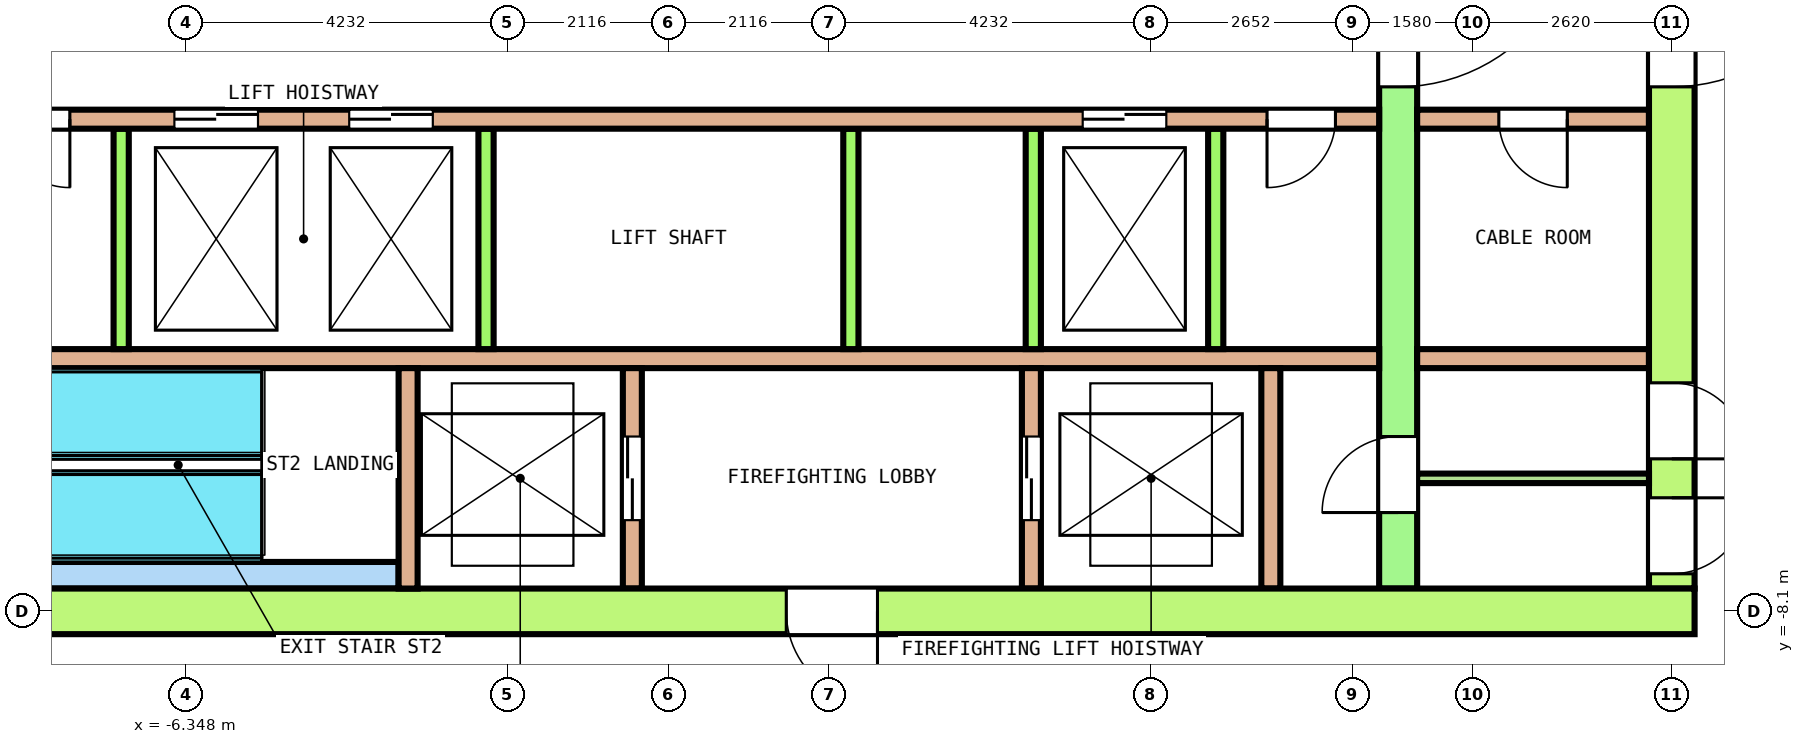
"""IFC4 building model, lengths in metres.
Left out: names, types, materials, properties, quantities, classifications, styles, units other than length and angle.
Written with IfcOpenShell. Run it as: python <this file> out.ifc"""

import sys

from ifc_helpers import new_model, si_unit, direction, frame, frame_2d, origin, place, context, subcontext, project, spatial, polyline, rectangle, outline, extrude, element, fill, save


model = new_model("IFC4")
c1 = context("Model", 3, precision=1e-05, world=origin(), true_north=direction((0.0, 1.0)))
c2 = subcontext(c1, "Body", "Model", "MODEL_VIEW")
j1 = project(units=[si_unit("LENGTHUNIT", "METRE"), si_unit("PLANEANGLEUNIT", "RADIAN")], contexts=[c1])
p1 = place(None, origin())
s1 = spatial("IfcSite", under=j1, at=p1, CompositionType="ELEMENT")
p2 = place(p1, origin())
s2 = spatial("IfcBuilding", under=s1, at=p2, CompositionType="ELEMENT")
p3 = place(p2, frame((0.0, 0.0, 223.4)))
s3 = spatial("IfcBuildingStorey", under=s2, at=p3, CompositionType="ELEMENT", Elevation=223.4)
p4 = place(p3, frame((13.914, -18.701, 0.0), z_axis=(0.0, 0.0, 1.0), x_axis=(0.499993148765, 0.866029359311, 0.0)))
e1 = element("IfcWall", 1, at=p4, inside=s3, PredefinedType="SOLIDWALL", context=c2, shape_type="SweptSolid", body=[
    extrude(outline(polyline([(-0.027, -0.1), (1.003, -0.1), (2.032, -0.1), (3.062, -0.1), (4.091, -0.1), (5.121, -0.1), (6.15, -0.1), (7.179, -0.1), (8.209, -0.1), (9.238, -0.1), (10.268, -0.1), (11.297, -0.1), (12.327, -0.1), (13.356, -0.1), (14.386, -0.1), (15.415, -0.1), (16.445, -0.1), (17.474, -0.1), (18.504, -0.1), (18.45, 0.1), (17.427, 0.1), (16.403, 0.1), (15.379, 0.1), (14.356, 0.1), (13.333, 0.1), (12.309, 0.1), (11.285, 0.1), (10.262, 0.1), (9.238, 0.1), (8.215, 0.1), (7.191, 0.1), (6.168, 0.1), (5.144, 0.1), (4.121, 0.1), (3.097, 0.1), (2.074, 0.1), (1.05, 0.1), (0.027, 0.1), (-0.027, -0.1)])), origin(), (0.0, 0.0, 1.0), 3.7),
])
p5 = place(p4, frame((0.398, 0.0, 0.1)))
e2 = element("IfcOpeningElement", 2, at=p5, cuts=e1, PredefinedType="OPENING", context=c2, shape_type="SweptSolid", body=[
    extrude(rectangle(XDim=2.9, YDim=2.65, at=frame_2d((1.45, 1.325))), frame((0.0, 0.11, 0.0), z_axis=(0.0, -1.0, 0.0), x_axis=(1.0, 0.0, 0.0)), (0.0, 0.0, 1.0), 0.22),
])
p6 = place(p4, frame((4.093, 0.0, 0.1)))
e3 = element("IfcOpeningElement", 3, at=p6, cuts=e1, PredefinedType="OPENING", context=c2, shape_type="SweptSolid", body=[
    extrude(rectangle(XDim=2.9, YDim=2.65, at=frame_2d((1.45, 1.325))), frame((0.0, 0.11, 0.0), z_axis=(0.0, -1.0, 0.0), x_axis=(1.0, 0.0, 0.0)), (0.0, 0.0, 1.0), 0.22),
])
p7 = place(p4, frame((8.338, 0.0, 0.0)))
e4 = element("IfcOpeningElement", 4, at=p7, cuts=e1, PredefinedType="OPENING", context=c2, shape_type="SweptSolid", body=[
    extrude(rectangle(XDim=1.8, YDim=2.4, at=frame_2d((0.9, 1.2))), frame((0.0, 0.11, 0.0), z_axis=(0.0, -1.0, 0.0), x_axis=(1.0, 0.0, 0.0)), (0.0, 0.0, 1.0), 0.22),
])
p8 = place(p4, frame((8.338, 0.0, 2.55)))
e5 = element("IfcOpeningElement", 5, at=p8, cuts=e1, PredefinedType="OPENING", context=c2, shape_type="SweptSolid", body=[
    extrude(rectangle(XDim=1.8, YDim=0.2, at=frame_2d((0.9, 0.1))), frame((0.0, 0.11, 0.0), z_axis=(0.0, -1.0, 0.0), x_axis=(1.0, 0.0, 0.0)), (0.0, 0.0, 1.0), 0.22),
])
p9 = place(p4, frame((11.484, 0.0, 0.1)))
e6 = element("IfcOpeningElement", 6, at=p9, cuts=e1, PredefinedType="OPENING", context=c2, shape_type="SweptSolid", body=[
    extrude(rectangle(XDim=2.9, YDim=2.65, at=frame_2d((1.45, 1.325))), frame((0.0, 0.11, 0.0), z_axis=(0.0, -1.0, 0.0), x_axis=(1.0, 0.0, 0.0)), (0.0, 0.0, 1.0), 0.22),
])
p10 = place(p4, frame((15.179, 0.0, 0.1)))
e7 = element("IfcOpeningElement", 7, at=p10, cuts=e1, PredefinedType="OPENING", context=c2, shape_type="SweptSolid", body=[
    extrude(rectangle(XDim=2.9, YDim=2.65, at=frame_2d((1.45, 1.325))), frame((0.0, 0.11, 0.0), z_axis=(0.0, -1.0, 0.0), x_axis=(1.0, 0.0, 0.0)), (0.0, 0.0, 1.0), 0.22),
])
p11 = place(p3, frame((-13.5, -8.1, 0.0), z_axis=(0.0, 0.0, 1.0), x_axis=(1.0, 0.0, 0.0)))
e8 = element("IfcWall", 8, at=p11, inside=s3, PredefinedType="SHEAR", context=c2, shape_type="SweptSolid", body=[
    extrude(rectangle(XDim=27.0, YDim=0.6, at=frame_2d((13.5, 0.0))), origin(), (0.0, 0.0, 1.0), 3.7),
])
p12 = place(p11, frame((15.05, 0.0, 0.0)))
e9 = element("IfcOpeningElement", 9, at=p12, cuts=e8, PredefinedType="OPENING", context=c2, shape_type="SweptSolid", body=[
    extrude(rectangle(XDim=1.2, YDim=2.1, at=frame_2d((0.6, 1.05))), frame((0.0, 0.31, 0.0), z_axis=(0.0, -1.0, 0.0), x_axis=(1.0, 0.0, 0.0)), (0.0, 0.0, 1.0), 0.62),
])
p13 = place(p3, frame((13.2, -7.8, 0.0), z_axis=(0.0, 0.0, 1.0), x_axis=(0.0, 1.0, 0.0)))
e10 = element("IfcWall", 10, at=p13, inside=s3, PredefinedType="SHEAR", context=c2, shape_type="SweptSolid", body=[
    extrude(rectangle(XDim=15.6, YDim=0.6, at=frame_2d((7.8, 0.0))), origin(), (0.0, 0.0, 1.0), 3.7),
])
p14 = place(p13, frame((6.6, 0.0, 0.0)))
e11 = element("IfcOpeningElement", 11, at=p14, cuts=e10, PredefinedType="OPENING", context=c2, shape_type="SweptSolid", body=[
    extrude(rectangle(XDim=2.4, YDim=2.1, at=frame_2d((1.2, 1.05))), frame((0.0, 0.31, 0.0), z_axis=(0.0, -1.0, 0.0), x_axis=(1.0, 0.0, 0.0)), (0.0, 0.0, 1.0), 0.62),
])
p15 = place(p13, frame((13.5, 0.0, 0.0)))
e12 = element("IfcOpeningElement", 12, at=p15, cuts=e10, PredefinedType="OPENING", context=c2, shape_type="SweptSolid", body=[
    extrude(rectangle(XDim=1.2, YDim=2.1, at=frame_2d((0.6, 1.05))), frame((0.0, 0.31, 0.0), z_axis=(0.0, -1.0, 0.0), x_axis=(1.0, 0.0, 0.0)), (0.0, 0.0, 1.0), 0.62),
])
p16 = place(p13, frame((0.194, 0.0, 0.0)))
e13 = element("IfcOpeningElement", 13, at=p16, cuts=e10, PredefinedType="OPENING", context=c2, shape_type="SweptSolid", body=[
    extrude(rectangle(XDim=1.0, YDim=2.1, at=frame_2d((0.5, 1.05))), frame((0.0, 0.31, 0.0), z_axis=(0.0, -1.0, 0.0), x_axis=(1.0, 0.0, 0.0)), (0.0, 0.0, 1.0), 0.62),
])
p17 = place(p13, frame((1.706, 0.0, 0.0)))
e14 = element("IfcOpeningElement", 14, at=p17, cuts=e10, PredefinedType="OPENING", context=c2, shape_type="SweptSolid", body=[
    extrude(rectangle(XDim=1.0, YDim=2.1, at=frame_2d((0.5, 1.05))), frame((0.0, 0.31, 0.0), z_axis=(0.0, -1.0, 0.0), x_axis=(1.0, 0.0, 0.0)), (0.0, 0.0, 1.0), 0.62),
])
p18 = place(p3, frame((9.6, -7.8, 0.0), z_axis=(0.0, 0.0, 1.0), x_axis=(0.0, 1.0, 0.0)))
e15 = element("IfcWall", 15, at=p18, inside=s3, PredefinedType="SHEAR", context=c2, shape_type="SweptSolid", body=[
    extrude(rectangle(XDim=15.6, YDim=0.5, at=frame_2d((7.8, 0.0))), origin(), (0.0, 0.0, 1.0), 3.7),
])
p19 = place(p18, frame((6.6, 0.0, 0.0)))
e16 = element("IfcOpeningElement", 16, at=p19, cuts=e15, PredefinedType="OPENING", context=c2, shape_type="SweptSolid", body=[
    extrude(rectangle(XDim=2.4, YDim=2.1, at=frame_2d((1.2, 1.05))), frame((0.0, 0.26, 0.0), z_axis=(0.0, -1.0, 0.0), x_axis=(1.0, 0.0, 0.0)), (0.0, 0.0, 1.0), 0.52),
])
p20 = place(p18, frame((13.5, 0.0, 0.0)))
e17 = element("IfcOpeningElement", 17, at=p20, cuts=e15, PredefinedType="OPENING", context=c2, shape_type="SweptSolid", body=[
    extrude(rectangle(XDim=1.2, YDim=2.1, at=frame_2d((0.6, 1.05))), frame((0.0, 0.26, 0.0), z_axis=(0.0, -1.0, 0.0), x_axis=(1.0, 0.0, 0.0)), (0.0, 0.0, 1.0), 0.52),
])
p21 = place(p18, frame((1.0, 0.0, 0.0)))
e18 = element("IfcOpeningElement", 18, at=p21, cuts=e15, PredefinedType="OPENING", context=c2, shape_type="SweptSolid", body=[
    extrude(rectangle(XDim=1.0, YDim=2.1, at=frame_2d((0.5, 1.05))), frame((0.0, 0.26, 0.0), z_axis=(0.0, -1.0, 0.0), x_axis=(1.0, 0.0, 0.0)), (0.0, 0.0, 1.0), 0.52),
])
p22 = place(p3, frame((-9.35, -1.625, 0.0), z_axis=(0.0, 0.0, 1.0), x_axis=(1.0, 0.0, 0.0)))
e19 = element("IfcWall", 19, at=p22, inside=s3, PredefinedType="SOLIDWALL", context=c2, shape_type="SweptSolid", body=[
    extrude(rectangle(XDim=18.7, YDim=0.25, at=frame_2d((9.35, 0.0))), origin(), (0.0, 0.0, 1.0), 3.7),
])
p23 = place(p22, frame((2.85, 0.0, 0.0)))
e20 = element("IfcOpeningElement", 20, at=p23, cuts=e19, PredefinedType="OPENING", context=c2, shape_type="SweptSolid", body=[
    extrude(rectangle(XDim=1.1, YDim=2.1, at=frame_2d((0.55, 1.05))), frame((0.0, 0.135, 0.0), z_axis=(0.0, -1.0, 0.0), x_axis=(1.0, 0.0, 0.0)), (0.0, 0.0, 1.0), 0.27),
])
p24 = place(p22, frame((5.15, 0.0, 0.0)))
e21 = element("IfcOpeningElement", 21, at=p24, cuts=e19, PredefinedType="OPENING", context=c2, shape_type="SweptSolid", body=[
    extrude(rectangle(XDim=1.1, YDim=2.1, at=frame_2d((0.55, 1.05))), frame((0.0, 0.135, 0.0), z_axis=(0.0, -1.0, 0.0), x_axis=(1.0, 0.0, 0.0)), (0.0, 0.0, 1.0), 0.27),
])
p25 = place(p22, frame((14.8, 0.0, 0.0)))
e22 = element("IfcOpeningElement", 22, at=p25, cuts=e19, PredefinedType="OPENING", context=c2, shape_type="SweptSolid", body=[
    extrude(rectangle(XDim=1.1, YDim=2.1, at=frame_2d((0.55, 1.05))), frame((0.0, 0.135, 0.0), z_axis=(0.0, -1.0, 0.0), x_axis=(1.0, 0.0, 0.0)), (0.0, 0.0, 1.0), 0.27),
])
p26 = place(p22, frame((0.575, 0.0, 0.0)))
e23 = element("IfcOpeningElement", 23, at=p26, cuts=e19, PredefinedType="OPENING", context=c2, shape_type="SweptSolid", body=[
    extrude(rectangle(XDim=0.9, YDim=2.1, at=frame_2d((0.45, 1.05))), frame((0.0, 0.135, 0.0), z_axis=(0.0, -1.0, 0.0), x_axis=(1.0, 0.0, 0.0)), (0.0, 0.0, 1.0), 0.27),
])
p27 = place(p22, frame((17.225, 0.0, 0.0)))
e24 = element("IfcOpeningElement", 24, at=p27, cuts=e19, PredefinedType="OPENING", context=c2, shape_type="SweptSolid", body=[
    extrude(rectangle(XDim=0.9, YDim=2.1, at=frame_2d((0.45, 1.05))), frame((0.0, 0.135, 0.0), z_axis=(0.0, -1.0, 0.0), x_axis=(1.0, 0.0, 0.0)), (0.0, 0.0, 1.0), 0.27),
])
p28 = place(p3, frame((9.85, -1.625, 0.0), z_axis=(0.0, 0.0, 1.0), x_axis=(1.0, 0.0, 0.0)))
e25 = element("IfcWall", 25, at=p28, inside=s3, PredefinedType="SOLIDWALL", context=c2, shape_type="SweptSolid", body=[
    extrude(rectangle(XDim=3.05, YDim=0.25, at=frame_2d((1.525, 0.0))), origin(), (0.0, 0.0, 1.0), 3.7),
])
p29 = place(p28, frame((1.075, 0.0, 0.0)))
e26 = element("IfcOpeningElement", 26, at=p29, cuts=e25, PredefinedType="OPENING", context=c2, shape_type="SweptSolid", body=[
    extrude(rectangle(XDim=0.9, YDim=2.1, at=frame_2d((0.45, 1.05))), frame((0.0, 0.135, 0.0), z_axis=(0.0, -1.0, 0.0), x_axis=(1.0, 0.0, 0.0)), (0.0, 0.0, 1.0), 0.27),
])
p30 = place(p3, frame((-9.35, -4.775, 0.0), z_axis=(0.0, 0.0, 1.0), x_axis=(1.0, 0.0, 0.0)))
e27 = element("IfcWall", 27, at=p30, inside=s3, PredefinedType="SOLIDWALL", context=c2, shape_type="SweptSolid", body=[
    extrude(rectangle(XDim=18.7, YDim=0.25, at=frame_2d((9.35, 0.0))), origin(), (0.0, 0.0, 1.0), 3.7),
])
p31 = place(p3, frame((9.85, -4.775, 0.0), z_axis=(0.0, 0.0, 1.0), x_axis=(1.0, 0.0, 0.0)))
e28 = element("IfcWall", 28, at=p31, inside=s3, PredefinedType="SOLIDWALL", context=c2, shape_type="SweptSolid", body=[
    extrude(rectangle(XDim=3.05, YDim=0.25, at=frame_2d((1.525, 0.0))), origin(), (0.0, 0.0, 1.0), 3.7),
])
for number, where, z_axis, x_axis in (
    (29, (-7.2, -4.65, 0.0), (0.0, 0.0, 1.0), (0.0, 1.0, 0.0)),
    (30, (-2.4, -4.65, 0.0), (0.0, 0.0, 1.0), (0.0, 1.0, 0.0)),
    (31, (2.4, -4.65, 0.0), (0.0, 0.0, 1.0), (0.0, 1.0, 0.0)),
    (32, (4.8, -4.65, 0.0), (0.0, 0.0, 1.0), (0.0, 1.0, 0.0)),
    (33, (7.2, -4.65, 0.0), (0.0, 0.0, 1.0), (0.0, 1.0, 0.0)),
):
    element("IfcWall", number, at=place(p3, frame(where, z_axis=z_axis, x_axis=x_axis)), inside=s3, PredefinedType="SOLIDWALL", context=c2, shape_type="SweptSolid", body=[
        extrude(rectangle(XDim=2.9, YDim=0.2, at=frame_2d((1.45, 0.0))), origin(), (0.0, 0.0, 1.0), 3.7),
    ])
p32 = place(p3, frame((-9.35, -7.625, 0.0), z_axis=(0.0, 0.0, 1.0), x_axis=(1.0, 0.0, 0.0)))
e34 = element("IfcWall", 34, at=p32, inside=s3, PredefinedType="SOLIDWALL", context=c2, shape_type="SweptSolid", body=[
    extrude(rectangle(XDim=5.8, YDim=0.35, at=frame_2d((2.9, 0.0))), origin(), (0.0, 0.0, 1.0), 3.7),
])
p33 = place(p3, frame((-3.425, -7.8, 0.0), z_axis=(0.0, 0.0, 1.0), x_axis=(0.0, 1.0, 0.0)))
e35 = element("IfcWall", 35, at=p33, inside=s3, PredefinedType="SOLIDWALL", context=c2, shape_type="SweptSolid", body=[
    extrude(rectangle(XDim=2.9, YDim=0.25, at=frame_2d((1.45, 0.0))), origin(), (0.0, 0.0, 1.0), 3.7),
])
p34 = place(p3, frame((-0.475, -7.8, 0.0), z_axis=(0.0, 0.0, 1.0), x_axis=(0.0, 1.0, 0.0)))
e36 = element("IfcWall", 36, at=p34, inside=s3, PredefinedType="SOLIDWALL", context=c2, shape_type="SweptSolid", body=[
    extrude(rectangle(XDim=2.9, YDim=0.25, at=frame_2d((1.45, 0.0))), origin(), (0.0, 0.0, 1.0), 3.7),
])
p35 = place(p34, frame((0.9, 0.0, 0.0)))
e37 = element("IfcOpeningElement", 37, at=p35, cuts=e36, PredefinedType="OPENING", context=c2, shape_type="SweptSolid", body=[
    extrude(rectangle(XDim=1.1, YDim=2.1, at=frame_2d((0.55, 1.05))), frame((0.0, 0.135, 0.0), z_axis=(0.0, -1.0, 0.0), x_axis=(1.0, 0.0, 0.0)), (0.0, 0.0, 1.0), 0.27),
])
p36 = place(p3, frame((4.775, -7.8, 0.0), z_axis=(0.0, 0.0, 1.0), x_axis=(0.0, 1.0, 0.0)))
e38 = element("IfcWall", 38, at=p36, inside=s3, PredefinedType="SOLIDWALL", context=c2, shape_type="SweptSolid", body=[
    extrude(rectangle(XDim=2.9, YDim=0.25, at=frame_2d((1.45, 0.0))), origin(), (0.0, 0.0, 1.0), 3.7),
])
p37 = place(p36, frame((0.9, 0.0, 0.0)))
e39 = element("IfcOpeningElement", 39, at=p37, cuts=e38, PredefinedType="OPENING", context=c2, shape_type="SweptSolid", body=[
    extrude(rectangle(XDim=1.1, YDim=2.1, at=frame_2d((0.55, 1.05))), frame((0.0, 0.135, 0.0), z_axis=(0.0, -1.0, 0.0), x_axis=(1.0, 0.0, 0.0)), (0.0, 0.0, 1.0), 0.27),
])
p38 = place(p3, frame((7.925, -7.8, 0.0), z_axis=(0.0, 0.0, 1.0), x_axis=(0.0, 1.0, 0.0)))
e40 = element("IfcWall", 40, at=p38, inside=s3, PredefinedType="SOLIDWALL", context=c2, shape_type="SweptSolid", body=[
    extrude(rectangle(XDim=2.9, YDim=0.25, at=frame_2d((1.45, 0.0))), origin(), (0.0, 0.0, 1.0), 3.7),
])
p39 = place(p3, frame((9.85, -6.35, 0.0), z_axis=(0.0, 0.0, 1.0), x_axis=(1.0, 0.0, 0.0)))
e41 = element("IfcWall", 41, at=p39, inside=s3, PredefinedType="PARTITIONING", context=c2, shape_type="SweptSolid", body=[
    extrude(rectangle(XDim=3.05, YDim=0.125, at=frame_2d((1.525, 0.0))), origin(), (0.0, 0.0, 1.0), 3.7),
])
p40 = place(p23, origin())
e42 = element("IfcDoor", 42, at=p40, inside=s3, OperationType="DOUBLE_DOOR_SLIDING", PredefinedType="DOOR", context=c2, shape_type="SweptSolid", body=[
    extrude(rectangle(XDim=1.1, YDim=2.1, at=frame_2d((0.55, 1.05))), frame((0.0, 0.075, 0.0), z_axis=(0.0, -1.0, 0.0), x_axis=(1.0, 0.0, 0.0)), (0.0, 0.0, 1.0), 0.15),
])
fill(e20, e42)
p41 = place(p24, origin())
e43 = element("IfcDoor", 43, at=p41, inside=s3, OperationType="DOUBLE_DOOR_SLIDING", PredefinedType="DOOR", context=c2, shape_type="SweptSolid", body=[
    extrude(rectangle(XDim=1.1, YDim=2.1, at=frame_2d((0.55, 1.05))), frame((0.0, 0.075, 0.0), z_axis=(0.0, -1.0, 0.0), x_axis=(1.0, 0.0, 0.0)), (0.0, 0.0, 1.0), 0.15),
])
fill(e21, e43)
p42 = place(p25, origin())
e44 = element("IfcDoor", 44, at=p42, inside=s3, OperationType="DOUBLE_DOOR_SLIDING", PredefinedType="DOOR", context=c2, shape_type="SweptSolid", body=[
    extrude(rectangle(XDim=1.1, YDim=2.1, at=frame_2d((0.55, 1.05))), frame((0.0, 0.075, 0.0), z_axis=(0.0, -1.0, 0.0), x_axis=(1.0, 0.0, 0.0)), (0.0, 0.0, 1.0), 0.15),
])
fill(e22, e44)
p43 = place(p35, origin())
e45 = element("IfcDoor", 45, at=p43, inside=s3, OperationType="DOUBLE_DOOR_SLIDING", PredefinedType="DOOR", context=c2, shape_type="SweptSolid", body=[
    extrude(rectangle(XDim=1.1, YDim=2.1, at=frame_2d((0.55, 1.05))), frame((0.0, 0.075, 0.0), z_axis=(0.0, -1.0, 0.0), x_axis=(1.0, 0.0, 0.0)), (0.0, 0.0, 1.0), 0.15),
])
fill(e37, e45)
p44 = place(p37, origin())
e46 = element("IfcDoor", 46, at=p44, inside=s3, OperationType="DOUBLE_DOOR_SLIDING", PredefinedType="DOOR", context=c2, shape_type="SweptSolid", body=[
    extrude(rectangle(XDim=1.1, YDim=2.1, at=frame_2d((0.55, 1.05))), frame((0.0, 0.075, 0.0), z_axis=(0.0, -1.0, 0.0), x_axis=(1.0, 0.0, 0.0)), (0.0, 0.0, 1.0), 0.15),
])
fill(e39, e46)
p45 = place(p19, origin())
e47 = element("IfcDoor", 47, at=p45, inside=s3, OperationType="DOUBLE_DOOR_SINGLE_SWING", PredefinedType="DOOR", context=c2, shape_type="SweptSolid", body=[
    extrude(rectangle(XDim=2.4, YDim=2.1, at=frame_2d((1.2, 1.05))), frame((0.0, 0.2, 0.0), z_axis=(0.0, -1.0, 0.0), x_axis=(1.0, 0.0, 0.0)), (0.0, 0.0, 1.0), 0.4),
])
fill(e16, e47)
p46 = place(p14, origin())
e48 = element("IfcDoor", 48, at=p46, inside=s3, OperationType="DOUBLE_DOOR_SINGLE_SWING", PredefinedType="DOOR", context=c2, shape_type="SweptSolid", body=[
    extrude(rectangle(XDim=2.4, YDim=2.1, at=frame_2d((1.2, 1.05))), frame((0.0, 0.25, 0.0), z_axis=(0.0, -1.0, 0.0), x_axis=(1.0, 0.0, 0.0)), (0.0, 0.0, 1.0), 0.5),
])
fill(e11, e48)
p47 = place(p12, origin())
e49 = element("IfcDoor", 49, at=p47, inside=s3, OperationType="SINGLE_SWING_RIGHT", PredefinedType="DOOR", context=c2, shape_type="SweptSolid", body=[
    extrude(rectangle(XDim=1.2, YDim=2.1, at=frame_2d((0.6, 1.05))), frame((0.0, 0.25, 0.0), z_axis=(0.0, -1.0, 0.0), x_axis=(1.0, 0.0, 0.0)), (0.0, 0.0, 1.0), 0.5),
])
fill(e9, e49)
p48 = place(p21, origin())
e50 = element("IfcDoor", 50, at=p48, inside=s3, OperationType="SINGLE_SWING_RIGHT", PredefinedType="DOOR", context=c2, shape_type="SweptSolid", body=[
    extrude(rectangle(XDim=1.0, YDim=2.1, at=frame_2d((0.5, 1.05))), frame((0.0, 0.2, 0.0), z_axis=(0.0, -1.0, 0.0), x_axis=(1.0, 0.0, 0.0)), (0.0, 0.0, 1.0), 0.4),
])
fill(e18, e50)
p49 = place(p16, origin())
e51 = element("IfcDoor", 51, at=p49, inside=s3, OperationType="SINGLE_SWING_LEFT", PredefinedType="DOOR", context=c2, shape_type="SweptSolid", body=[
    extrude(rectangle(XDim=1.0, YDim=2.1, at=frame_2d((0.5, 1.05))), frame((0.0, 0.25, 0.0), z_axis=(0.0, -1.0, 0.0), x_axis=(1.0, 0.0, 0.0)), (0.0, 0.0, 1.0), 0.5),
])
fill(e13, e51)
p50 = place(p17, origin())
e52 = element("IfcDoor", 52, at=p50, inside=s3, OperationType="SINGLE_SWING_RIGHT", PredefinedType="DOOR", context=c2, shape_type="SweptSolid", body=[
    extrude(rectangle(XDim=1.0, YDim=2.1, at=frame_2d((0.5, 1.05))), frame((0.0, 0.25, 0.0), z_axis=(0.0, -1.0, 0.0), x_axis=(1.0, 0.0, 0.0)), (0.0, 0.0, 1.0), 0.5),
])
fill(e14, e52)
p51 = place(p26, origin())
e53 = element("IfcDoor", 53, at=p51, inside=s3, OperationType="SINGLE_SWING_RIGHT", PredefinedType="DOOR", context=c2, shape_type="SweptSolid", body=[
    extrude(rectangle(XDim=0.9, YDim=2.1, at=frame_2d((0.45, 1.05))), frame((0.0, 0.075, 0.0), z_axis=(0.0, -1.0, 0.0), x_axis=(1.0, 0.0, 0.0)), (0.0, 0.0, 1.0), 0.15),
])
fill(e23, e53)
p52 = place(p27, origin())
e54 = element("IfcDoor", 54, at=p52, inside=s3, OperationType="SINGLE_SWING_LEFT", PredefinedType="DOOR", context=c2, shape_type="SweptSolid", body=[
    extrude(rectangle(XDim=0.9, YDim=2.1, at=frame_2d((0.45, 1.05))), frame((0.0, 0.075, 0.0), z_axis=(0.0, -1.0, 0.0), x_axis=(1.0, 0.0, 0.0)), (0.0, 0.0, 1.0), 0.15),
])
fill(e24, e54)
p53 = place(p29, origin())
e55 = element("IfcDoor", 55, at=p53, inside=s3, OperationType="SINGLE_SWING_RIGHT", PredefinedType="DOOR", context=c2, shape_type="SweptSolid", body=[
    extrude(rectangle(XDim=0.9, YDim=2.1, at=frame_2d((0.45, 1.05))), frame((0.0, 0.075, 0.0), z_axis=(0.0, -1.0, 0.0), x_axis=(1.0, 0.0, 0.0)), (0.0, 0.0, 1.0), 0.15),
])
fill(e26, e55)
save(model, sys.argv[1])
